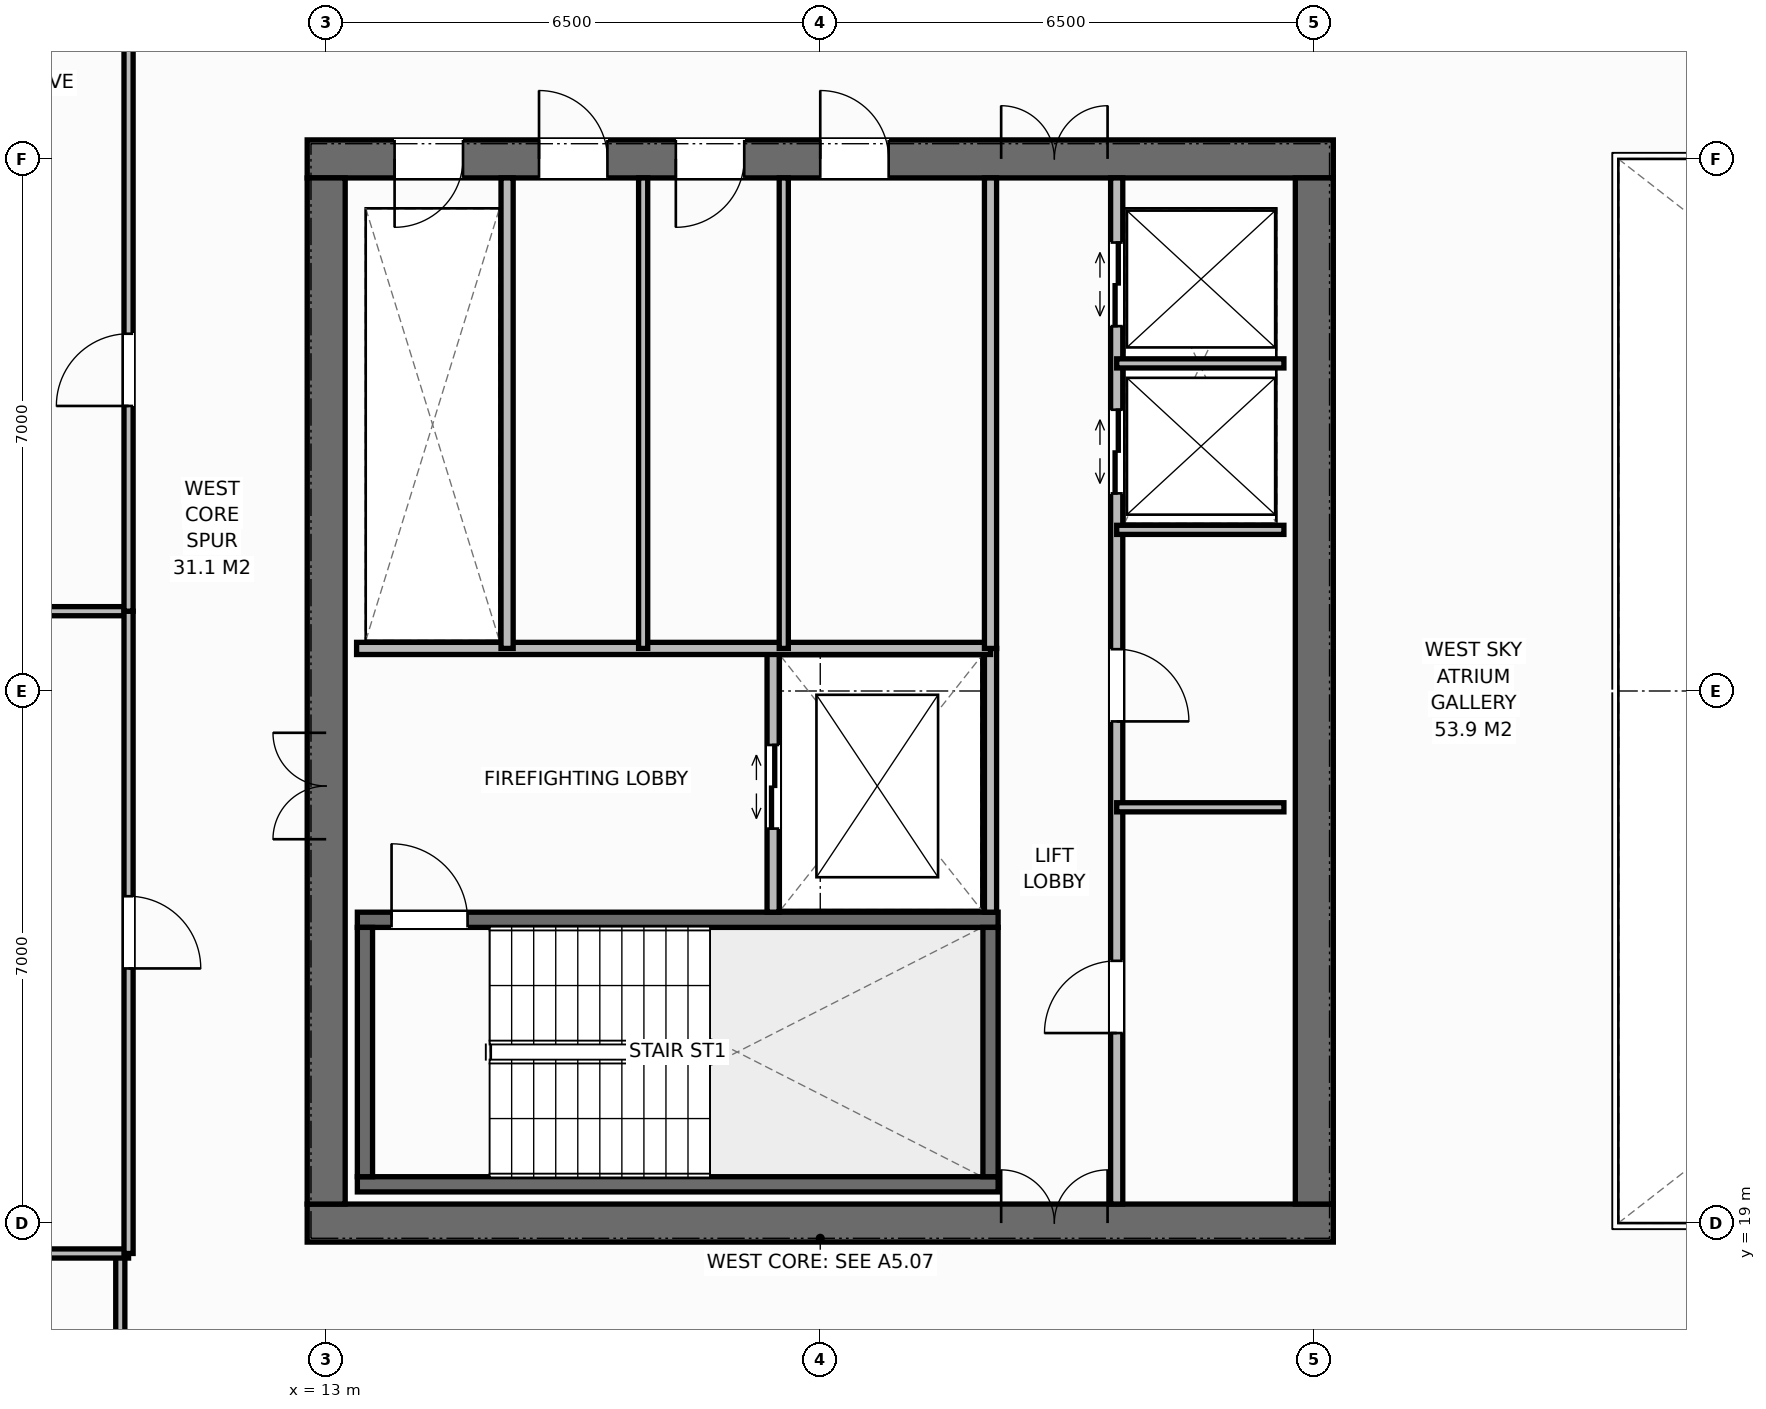
"""IFC4 building model, lengths in metres.
Left out: names, types, materials, properties, quantities, classifications, styles, units other than length and angle.
Written with IfcOpenShell. Run it as: python <this file> out.ifc"""

import sys

from ifc_helpers import new_model, si_unit, direction, frame, frame_2d, origin, place, context, subcontext, project, spatial, rectangle, extrude, element, fill, save


model = new_model("IFC4")
c1 = context("Model", 3, precision=1e-05, world=origin(), true_north=direction((0.0, 1.0)))
c2 = subcontext(c1, "Body", "Model", "MODEL_VIEW")
j1 = project(units=[si_unit("LENGTHUNIT", "METRE"), si_unit("PLANEANGLEUNIT", "RADIAN")], contexts=[c1])
p1 = place(None, origin())
s1 = spatial("IfcSite", under=j1, at=p1, CompositionType="ELEMENT")
p2 = place(p1, origin())
s2 = spatial("IfcBuilding", under=s1, at=p2, CompositionType="ELEMENT")
p3 = place(p2, frame((0.0, 0.0, 213.8)))
s3 = spatial("IfcBuildingStorey", under=s2, at=p3, CompositionType="ELEMENT", Elevation=213.8)
p4 = place(p3, frame((12.75, 19.0, 0.0), z_axis=(0.0, 0.0, 1.0), x_axis=(1.0, 0.0, 0.0)))
e1 = element("IfcWall", 1, at=p4, inside=s3, PredefinedType="SHEAR", context=c2, shape_type="SweptSolid", body=[
    extrude(rectangle(XDim=13.5, YDim=0.5, at=frame_2d((6.75, 0.0))), origin(), (0.0, 0.0, 1.0), 3.8),
])
p5 = place(p4, frame((9.13, 0.0, 0.0)))
e2 = element("IfcOpeningElement", 2, at=p5, cuts=e1, PredefinedType="OPENING", context=c2, shape_type="SweptSolid", body=[
    extrude(rectangle(XDim=1.4, YDim=2.2, at=frame_2d((0.7, 1.1))), frame((0.0, 0.26, 0.0), z_axis=(0.0, -1.0, 0.0), x_axis=(1.0, 0.0, 0.0)), (0.0, 0.0, 1.0), 0.52),
])
p6 = place(p3, frame((12.75, 33.0, 0.0), z_axis=(0.0, 0.0, 1.0), x_axis=(1.0, 0.0, 0.0)))
e3 = element("IfcWall", 3, at=p6, inside=s3, PredefinedType="SHEAR", context=c2, shape_type="SweptSolid", body=[
    extrude(rectangle(XDim=13.5, YDim=0.5, at=frame_2d((6.75, 0.0))), origin(), (0.0, 0.0, 1.0), 3.8),
])
p7 = place(p6, frame((1.15, 0.0, 0.0)))
e4 = element("IfcOpeningElement", 4, at=p7, cuts=e3, PredefinedType="OPENING", context=c2, shape_type="SweptSolid", body=[
    extrude(rectangle(XDim=0.9, YDim=2.15, at=frame_2d((0.45, 1.075))), frame((0.0, 0.26, 0.0), z_axis=(0.0, -1.0, 0.0), x_axis=(1.0, 0.0, 0.0)), (0.0, 0.0, 1.0), 0.52),
])
p8 = place(p6, frame((3.05, 0.0, 0.0)))
e5 = element("IfcOpeningElement", 5, at=p8, cuts=e3, PredefinedType="OPENING", context=c2, shape_type="SweptSolid", body=[
    extrude(rectangle(XDim=0.9, YDim=2.15, at=frame_2d((0.45, 1.075))), frame((0.0, 0.26, 0.0), z_axis=(0.0, -1.0, 0.0), x_axis=(1.0, 0.0, 0.0)), (0.0, 0.0, 1.0), 0.52),
])
p9 = place(p6, frame((4.85, 0.0, 0.0)))
e6 = element("IfcOpeningElement", 6, at=p9, cuts=e3, PredefinedType="OPENING", context=c2, shape_type="SweptSolid", body=[
    extrude(rectangle(XDim=0.9, YDim=2.15, at=frame_2d((0.45, 1.075))), frame((0.0, 0.26, 0.0), z_axis=(0.0, -1.0, 0.0), x_axis=(1.0, 0.0, 0.0)), (0.0, 0.0, 1.0), 0.52),
])
p10 = place(p6, frame((6.75, 0.0, 0.0)))
e7 = element("IfcOpeningElement", 7, at=p10, cuts=e3, PredefinedType="OPENING", context=c2, shape_type="SweptSolid", body=[
    extrude(rectangle(XDim=0.9, YDim=2.15, at=frame_2d((0.45, 1.075))), frame((0.0, 0.26, 0.0), z_axis=(0.0, -1.0, 0.0), x_axis=(1.0, 0.0, 0.0)), (0.0, 0.0, 1.0), 0.52),
])
p11 = place(p6, frame((9.13, 0.0, 0.0)))
e8 = element("IfcOpeningElement", 8, at=p11, cuts=e3, PredefinedType="OPENING", context=c2, shape_type="SweptSolid", body=[
    extrude(rectangle(XDim=1.4, YDim=2.2, at=frame_2d((0.7, 1.1))), frame((0.0, 0.26, 0.0), z_axis=(0.0, -1.0, 0.0), x_axis=(1.0, 0.0, 0.0)), (0.0, 0.0, 1.0), 0.52),
])
p12 = place(p3, frame((13.0, 19.25, 0.0), z_axis=(0.0, 0.0, 1.0), x_axis=(0.0, 1.0, 0.0)))
e9 = element("IfcWall", 9, at=p12, inside=s3, PredefinedType="SHEAR", context=c2, shape_type="SweptSolid", body=[
    extrude(rectangle(XDim=13.5, YDim=0.5, at=frame_2d((6.75, 0.0))), origin(), (0.0, 0.0, 1.0), 3.8),
])
p13 = place(p12, frame((4.8, 0.0, 0.0)))
e10 = element("IfcOpeningElement", 10, at=p13, cuts=e9, PredefinedType="OPENING", context=c2, shape_type="SweptSolid", body=[
    extrude(rectangle(XDim=1.4, YDim=2.2, at=frame_2d((0.7, 1.1))), frame((0.0, 0.26, 0.0), z_axis=(0.0, -1.0, 0.0), x_axis=(1.0, 0.0, 0.0)), (0.0, 0.0, 1.0), 0.52),
])
p14 = place(p3, frame((26.0, 19.25, 0.0), z_axis=(0.0, 0.0, 1.0), x_axis=(0.0, 1.0, 0.0)))
e11 = element("IfcWall", 11, at=p14, inside=s3, PredefinedType="SHEAR", context=c2, shape_type="SweptSolid", body=[
    extrude(rectangle(XDim=13.5, YDim=0.5, at=frame_2d((6.75, 0.0))), origin(), (0.0, 0.0, 1.0), 3.8),
])
p15 = place(p3, frame((13.41, 19.51, 0.0), z_axis=(0.0, 0.0, 1.0), x_axis=(1.0, 0.0, 0.0)))
e12 = element("IfcWall", 12, at=p15, inside=s3, PredefinedType="SHEAR", context=c2, shape_type="SweptSolid", body=[
    extrude(rectangle(XDim=8.43, YDim=0.2, at=frame_2d((4.215, 0.0))), origin(), (0.0, 0.0, 1.0), 3.8),
])
p16 = place(p3, frame((13.41, 22.99, 0.0), z_axis=(0.0, 0.0, 1.0), x_axis=(1.0, 0.0, 0.0)))
e13 = element("IfcWall", 13, at=p16, inside=s3, PredefinedType="SHEAR", context=c2, shape_type="SweptSolid", body=[
    extrude(rectangle(XDim=8.43, YDim=0.2, at=frame_2d((4.215, 0.0))), origin(), (0.0, 0.0, 1.0), 3.8),
])
p17 = place(p16, frame((0.45, 0.0, 0.0)))
e14 = element("IfcOpeningElement", 14, at=p17, cuts=e13, PredefinedType="OPENING", context=c2, shape_type="SweptSolid", body=[
    extrude(rectangle(XDim=1.0, YDim=2.15, at=frame_2d((0.5, 1.075))), frame((0.0, 0.11, 0.0), z_axis=(0.0, -1.0, 0.0), x_axis=(1.0, 0.0, 0.0)), (0.0, 0.0, 1.0), 0.22),
])
for number, where, z_axis, x_axis in (
    (15, (13.51, 19.61, 0.0), (0.0, 0.0, 1.0), (0.0, 1.0, 0.0)),
    (16, (21.74, 19.61, 0.0), (0.0, 0.0, 1.0), (0.0, 1.0, 0.0)),
):
    element("IfcWall", number, at=place(p3, frame(where, z_axis=z_axis, x_axis=x_axis)), inside=s3, PredefinedType="SHEAR", context=c2, shape_type="SweptSolid", body=[
        extrude(rectangle(XDim=3.28, YDim=0.2, at=frame_2d((1.64, 0.0))), origin(), (0.0, 0.0, 1.0), 3.8),
    ])
p18 = place(p3, frame((21.74, 23.09, 0.0), z_axis=(0.0, 0.0, 1.0), x_axis=(0.0, 1.0, 0.0)))
e17 = element("IfcWall", 17, at=p18, inside=s3, PredefinedType="STANDARD", context=c2, shape_type="SweptSolid", body=[
    extrude(rectangle(XDim=3.47, YDim=0.16, at=frame_2d((1.735, 0.0))), origin(), (0.0, 0.0, 1.0), 3.58),
])
p19 = place(p3, frame((18.88, 23.09, 0.0), z_axis=(0.0, 0.0, 1.0), x_axis=(0.0, 1.0, 0.0)))
e18 = element("IfcWall", 18, at=p19, inside=s3, PredefinedType="STANDARD", context=c2, shape_type="SweptSolid", body=[
    extrude(rectangle(XDim=3.47, YDim=0.16, at=frame_2d((1.735, 0.0))), origin(), (0.0, 0.0, 1.0), 3.58),
])
p20 = place(p19, frame((1.1, 0.0, 0.0)))
e19 = element("IfcOpeningElement", 19, at=p20, cuts=e18, PredefinedType="OPENING", context=c2, shape_type="SweptSolid", body=[
    extrude(rectangle(XDim=1.1, YDim=2.2, at=frame_2d((0.55, 1.1))), frame((0.0, 0.09, 0.0), z_axis=(0.0, -1.0, 0.0), x_axis=(1.0, 0.0, 0.0)), (0.0, 0.0, 1.0), 0.18),
])
p21 = place(p3, frame((13.4, 26.56, 0.0), z_axis=(0.0, 0.0, 1.0), x_axis=(1.0, 0.0, 0.0)))
e20 = element("IfcWall", 20, at=p21, inside=s3, PredefinedType="STANDARD", context=c2, shape_type="SweptSolid", body=[
    extrude(rectangle(XDim=8.34, YDim=0.16, at=frame_2d((4.17, 0.0))), origin(), (0.0, 0.0, 1.0), 3.58),
])
p22 = place(p3, frame((15.38, 26.56, 0.0), z_axis=(0.0, 0.0, 1.0), x_axis=(0.0, 1.0, 0.0)))
e21 = element("IfcWall", 21, at=p22, inside=s3, PredefinedType="STANDARD", context=c2, shape_type="SweptSolid", body=[
    extrude(rectangle(XDim=6.19, YDim=0.16, at=frame_2d((3.095, 0.0))), origin(), (0.0, 0.0, 1.0), 3.58),
])
for number, where, z_axis, x_axis in (
    (22, (17.17, 26.56, 0.0), (0.0, 0.0, 1.0), (0.0, 1.0, 0.0)),
    (23, (19.02, 26.56, 0.0), (0.0, 0.0, 1.0), (0.0, 1.0, 0.0)),
):
    element("IfcWall", number, at=place(p3, frame(where, z_axis=z_axis, x_axis=x_axis)), inside=s3, PredefinedType="PARTITIONING", context=c2, shape_type="SweptSolid", body=[
        extrude(rectangle(XDim=6.19, YDim=0.12, at=frame_2d((3.095, 0.0))), origin(), (0.0, 0.0, 1.0), 3.58),
    ])
p23 = place(p3, frame((21.74, 26.56, 0.0), z_axis=(0.0, 0.0, 1.0), x_axis=(0.0, 1.0, 0.0)))
e24 = element("IfcWall", 24, at=p23, inside=s3, PredefinedType="STANDARD", context=c2, shape_type="SweptSolid", body=[
    extrude(rectangle(XDim=6.19, YDim=0.16, at=frame_2d((3.095, 0.0))), origin(), (0.0, 0.0, 1.0), 3.58),
])
p24 = place(p3, frame((23.4, 19.25, 0.0), z_axis=(0.0, 0.0, 1.0), x_axis=(0.0, 1.0, 0.0)))
e25 = element("IfcWall", 25, at=p24, inside=s3, PredefinedType="STANDARD", context=c2, shape_type="SweptSolid", body=[
    extrude(rectangle(XDim=13.5, YDim=0.16, at=frame_2d((6.75, 0.0))), origin(), (0.0, 0.0, 1.0), 3.58),
])
p25 = place(p24, frame((2.25, 0.0, 0.0)))
e26 = element("IfcOpeningElement", 26, at=p25, cuts=e25, PredefinedType="OPENING", context=c2, shape_type="SweptSolid", body=[
    extrude(rectangle(XDim=0.95, YDim=2.15, at=frame_2d((0.475, 1.075))), frame((0.0, 0.09, 0.0), z_axis=(0.0, -1.0, 0.0), x_axis=(1.0, 0.0, 0.0)), (0.0, 0.0, 1.0), 0.18),
])
p26 = place(p24, frame((6.35, 0.0, 0.0)))
e27 = element("IfcOpeningElement", 27, at=p26, cuts=e25, PredefinedType="OPENING", context=c2, shape_type="SweptSolid", body=[
    extrude(rectangle(XDim=0.95, YDim=2.15, at=frame_2d((0.475, 1.075))), frame((0.0, 0.09, 0.0), z_axis=(0.0, -1.0, 0.0), x_axis=(1.0, 0.0, 0.0)), (0.0, 0.0, 1.0), 0.18),
])
p27 = place(p24, frame((9.35, 0.0, 0.0)))
e28 = element("IfcOpeningElement", 28, at=p27, cuts=e25, PredefinedType="OPENING", context=c2, shape_type="SweptSolid", body=[
    extrude(rectangle(XDim=1.1, YDim=2.2, at=frame_2d((0.55, 1.1))), frame((0.0, 0.09, 0.0), z_axis=(0.0, -1.0, 0.0), x_axis=(1.0, 0.0, 0.0)), (0.0, 0.0, 1.0), 0.18),
])
p28 = place(p24, frame((11.55, 0.0, 0.0)))
e29 = element("IfcOpeningElement", 29, at=p28, cuts=e25, PredefinedType="OPENING", context=c2, shape_type="SweptSolid", body=[
    extrude(rectangle(XDim=1.1, YDim=2.2, at=frame_2d((0.55, 1.1))), frame((0.0, 0.09, 0.0), z_axis=(0.0, -1.0, 0.0), x_axis=(1.0, 0.0, 0.0)), (0.0, 0.0, 1.0), 0.18),
])
for number, where, z_axis, x_axis in (
    (30, (23.4, 24.47, 0.0), (0.0, 0.0, 1.0), (1.0, 0.0, 0.0)),
    (31, (23.4, 28.12, 0.0), (0.0, 0.0, 1.0), (1.0, 0.0, 0.0)),
    (32, (23.4, 30.31, 0.0), (0.0, 0.0, 1.0), (1.0, 0.0, 0.0)),
):
    element("IfcWall", number, at=place(p3, frame(where, z_axis=z_axis, x_axis=x_axis)), inside=s3, PredefinedType="PARTITIONING", context=c2, shape_type="SweptSolid", body=[
        extrude(rectangle(XDim=2.2, YDim=0.12, at=frame_2d((1.1, 0.0))), origin(), (0.0, 0.0, 1.0), 3.58),
    ])
p29 = place(p3, frame((10.291, 16.5, 0.0), z_axis=(0.0, 0.0, 1.0), x_axis=(0.0, 1.0, 0.0)))
e33 = element("IfcWall", 33, at=p29, inside=s3, PredefinedType="PARTITIONING", context=c2, shape_type="SweptSolid", body=[
    extrude(rectangle(XDim=2.1, YDim=0.12, at=frame_2d((1.05, 0.0))), origin(), (0.0, 0.0, 1.0), 3.58),
])
for number, where, z_axis, x_axis in (
    (34, (5.82, 18.6, 0.0), (0.0, 0.0, 1.0), (1.0, 0.0, 0.0)),
    (35, (5.82, 27.05, 0.0), (0.0, 0.0, 1.0), (1.0, 0.0, 0.0)),
):
    element("IfcWall", number, at=place(p3, frame(where, z_axis=z_axis, x_axis=x_axis)), inside=s3, PredefinedType="PARTITIONING", context=c2, shape_type="SweptSolid", body=[
        extrude(rectangle(XDim=4.58, YDim=0.12, at=frame_2d((2.29, 0.0))), origin(), (0.0, 0.0, 1.0), 3.58),
    ])
p30 = place(p3, frame((10.4, 18.6, 0.0), z_axis=(0.0, 0.0, 1.0), x_axis=(0.0, 1.0, 0.0)))
e36 = element("IfcWall", 36, at=p30, inside=s3, PredefinedType="PARTITIONING", context=c2, shape_type="SweptSolid", body=[
    extrude(rectangle(XDim=8.45, YDim=0.12, at=frame_2d((4.225, 0.0))), origin(), (0.0, 0.0, 1.0), 3.58),
])
p31 = place(p30, frame((3.75, 0.0, 0.0)))
e37 = element("IfcOpeningElement", 37, at=p31, cuts=e36, PredefinedType="OPENING", context=c2, shape_type="SweptSolid", body=[
    extrude(rectangle(XDim=0.95, YDim=2.15, at=frame_2d((0.475, 1.075))), frame((0.0, 0.07, 0.0), z_axis=(0.0, -1.0, 0.0), x_axis=(1.0, 0.0, 0.0)), (0.0, 0.0, 1.0), 0.14),
])
p32 = place(p3, frame((10.4, 27.05, 0.0), z_axis=(0.0, 0.0, 1.0), x_axis=(0.0, 1.0, 0.0)))
e38 = element("IfcWall", 38, at=p32, inside=s3, PredefinedType="PARTITIONING", context=c2, shape_type="SweptSolid", body=[
    extrude(rectangle(XDim=8.45, YDim=0.12, at=frame_2d((4.225, 0.0))), origin(), (0.0, 0.0, 1.0), 3.58),
])
p33 = place(p32, frame((2.7, 0.0, 0.0)))
e39 = element("IfcOpeningElement", 39, at=p33, cuts=e38, PredefinedType="OPENING", context=c2, shape_type="SweptSolid", body=[
    extrude(rectangle(XDim=0.95, YDim=2.15, at=frame_2d((0.475, 1.075))), frame((0.0, 0.07, 0.0), z_axis=(0.0, -1.0, 0.0), x_axis=(1.0, 0.0, 0.0)), (0.0, 0.0, 1.0), 0.14),
])
p34 = place(p17, origin())
e40 = element("IfcDoor", 40, at=p34, inside=s3, OperationType="SINGLE_SWING_LEFT", PredefinedType="DOOR", context=c2, shape_type="SweptSolid", body=[
    extrude(rectangle(XDim=1.0, YDim=2.15, at=frame_2d((0.5, 1.075))), frame((0.0, 0.025, 0.0), z_axis=(0.0, -1.0, 0.0), x_axis=(1.0, 0.0, 0.0)), (0.0, 0.0, 1.0), 0.05),
])
fill(e14, e40)
p35 = place(p13, origin())
e41 = element("IfcDoor", 41, at=p35, inside=s3, OperationType="DOUBLE_DOOR_SINGLE_SWING", PredefinedType="DOOR", context=c2, shape_type="SweptSolid", body=[
    extrude(rectangle(XDim=1.4, YDim=2.2, at=frame_2d((0.7, 1.1))), frame((0.0, 0.025, 0.0), z_axis=(0.0, -1.0, 0.0), x_axis=(1.0, 0.0, 0.0)), (0.0, 0.0, 1.0), 0.05),
])
fill(e10, e41)
p36 = place(p20, origin())
e42 = element("IfcDoor", 42, at=p36, inside=s3, OperationType="DOUBLE_DOOR_SLIDING", PredefinedType="DOOR", context=c2, shape_type="SweptSolid", body=[
    extrude(rectangle(XDim=1.1, YDim=2.2, at=frame_2d((0.55, 1.1))), frame((0.0, 0.025, 0.0), z_axis=(0.0, -1.0, 0.0), x_axis=(1.0, 0.0, 0.0)), (0.0, 0.0, 1.0), 0.05),
])
fill(e19, e42)
p37 = place(p7, origin())
e43 = element("IfcDoor", 43, at=p37, inside=s3, OperationType="SINGLE_SWING_RIGHT", PredefinedType="DOOR", context=c2, shape_type="SweptSolid", body=[
    extrude(rectangle(XDim=0.9, YDim=2.15, at=frame_2d((0.45, 1.075))), frame((0.0, -0.025, 0.0), z_axis=(0.0, -1.0, 0.0), x_axis=(1.0, 0.0, 0.0)), (0.0, 0.0, 1.0), 0.05),
])
fill(e4, e43)
p38 = place(p8, origin())
e44 = element("IfcDoor", 44, at=p38, inside=s3, OperationType="SINGLE_SWING_LEFT", PredefinedType="DOOR", context=c2, shape_type="SweptSolid", body=[
    extrude(rectangle(XDim=0.9, YDim=2.15, at=frame_2d((0.45, 1.075))), frame((0.0, -0.025, 0.0), z_axis=(0.0, -1.0, 0.0), x_axis=(1.0, 0.0, 0.0)), (0.0, 0.0, 1.0), 0.05),
])
fill(e5, e44)
p39 = place(p9, origin())
e45 = element("IfcDoor", 45, at=p39, inside=s3, OperationType="SINGLE_SWING_RIGHT", PredefinedType="DOOR", context=c2, shape_type="SweptSolid", body=[
    extrude(rectangle(XDim=0.9, YDim=2.15, at=frame_2d((0.45, 1.075))), frame((0.0, -0.025, 0.0), z_axis=(0.0, -1.0, 0.0), x_axis=(1.0, 0.0, 0.0)), (0.0, 0.0, 1.0), 0.05),
])
fill(e6, e45)
p40 = place(p10, origin())
e46 = element("IfcDoor", 46, at=p40, inside=s3, OperationType="SINGLE_SWING_LEFT", PredefinedType="DOOR", context=c2, shape_type="SweptSolid", body=[
    extrude(rectangle(XDim=0.9, YDim=2.15, at=frame_2d((0.45, 1.075))), frame((0.0, -0.025, 0.0), z_axis=(0.0, -1.0, 0.0), x_axis=(1.0, 0.0, 0.0)), (0.0, 0.0, 1.0), 0.05),
])
fill(e7, e46)
p41 = place(p5, origin())
e47 = element("IfcDoor", 47, at=p41, inside=s3, OperationType="DOUBLE_DOOR_SINGLE_SWING", PredefinedType="DOOR", context=c2, shape_type="SweptSolid", body=[
    extrude(rectangle(XDim=1.4, YDim=2.2, at=frame_2d((0.7, 1.1))), frame((0.0, 0.075, 0.0), z_axis=(0.0, -1.0, 0.0), x_axis=(1.0, 0.0, 0.0)), (0.0, 0.0, 1.0), 0.05),
])
fill(e2, e47)
p42 = place(p11, origin())
e48 = element("IfcDoor", 48, at=p42, inside=s3, OperationType="DOUBLE_DOOR_SINGLE_SWING", PredefinedType="DOOR", context=c2, shape_type="SweptSolid", body=[
    extrude(rectangle(XDim=1.4, YDim=2.2, at=frame_2d((0.7, 1.1))), frame((0.0, -0.025, 0.0), z_axis=(0.0, -1.0, 0.0), x_axis=(1.0, 0.0, 0.0)), (0.0, 0.0, 1.0), 0.05),
])
fill(e8, e48)
p43 = place(p25, origin())
e49 = element("IfcDoor", 49, at=p43, inside=s3, OperationType="SINGLE_SWING_LEFT", PredefinedType="DOOR", context=c2, shape_type="SweptSolid", body=[
    extrude(rectangle(XDim=0.95, YDim=2.15, at=frame_2d((0.475, 1.075))), frame((0.0, 0.025, 0.0), z_axis=(0.0, -1.0, 0.0), x_axis=(1.0, 0.0, 0.0)), (0.0, 0.0, 1.0), 0.05),
])
fill(e26, e49)
p44 = place(p26, origin())
e50 = element("IfcDoor", 50, at=p44, inside=s3, OperationType="SINGLE_SWING_RIGHT", PredefinedType="DOOR", context=c2, shape_type="SweptSolid", body=[
    extrude(rectangle(XDim=0.95, YDim=2.15, at=frame_2d((0.475, 1.075))), frame((0.0, 0.025, 0.0), z_axis=(0.0, -1.0, 0.0), x_axis=(1.0, 0.0, 0.0)), (0.0, 0.0, 1.0), 0.05),
])
fill(e27, e50)
p45 = place(p27, origin())
e51 = element("IfcDoor", 51, at=p45, inside=s3, OperationType="DOUBLE_DOOR_SLIDING", PredefinedType="DOOR", context=c2, shape_type="SweptSolid", body=[
    extrude(rectangle(XDim=1.1, YDim=2.2, at=frame_2d((0.55, 1.1))), frame((0.0, 0.025, 0.0), z_axis=(0.0, -1.0, 0.0), x_axis=(1.0, 0.0, 0.0)), (0.0, 0.0, 1.0), 0.05),
])
fill(e28, e51)
p46 = place(p28, origin())
e52 = element("IfcDoor", 52, at=p46, inside=s3, OperationType="DOUBLE_DOOR_SLIDING", PredefinedType="DOOR", context=c2, shape_type="SweptSolid", body=[
    extrude(rectangle(XDim=1.1, YDim=2.2, at=frame_2d((0.55, 1.1))), frame((0.0, 0.025, 0.0), z_axis=(0.0, -1.0, 0.0), x_axis=(1.0, 0.0, 0.0)), (0.0, 0.0, 1.0), 0.05),
])
fill(e29, e52)
p47 = place(p31, origin())
e53 = element("IfcDoor", 53, at=p47, inside=s3, OperationType="SINGLE_SWING_RIGHT", PredefinedType="DOOR", context=c2, shape_type="SweptSolid", body=[
    extrude(rectangle(XDim=0.95, YDim=2.15, at=frame_2d((0.475, 1.075))), frame((0.0, 0.025, 0.0), z_axis=(0.0, -1.0, 0.0), x_axis=(1.0, 0.0, 0.0)), (0.0, 0.0, 1.0), 0.05),
])
fill(e37, e53)
p48 = place(p33, origin())
e54 = element("IfcDoor", 54, at=p48, inside=s3, OperationType="SINGLE_SWING_LEFT", PredefinedType="DOOR", context=c2, shape_type="SweptSolid", body=[
    extrude(rectangle(XDim=0.95, YDim=2.15, at=frame_2d((0.475, 1.075))), frame((0.0, 0.025, 0.0), z_axis=(0.0, -1.0, 0.0), x_axis=(1.0, 0.0, 0.0)), (0.0, 0.0, 1.0), 0.05),
])
fill(e39, e54)
save(model, sys.argv[1])
